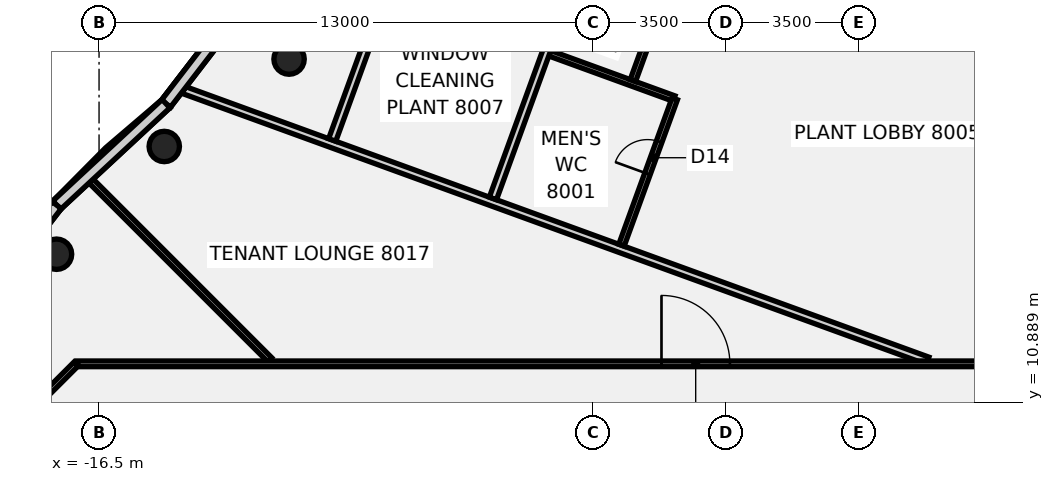
"""IFC4 building model, lengths in metres.
Left out: names, types, materials, properties, quantities, classifications, styles, units other than length and angle.
Written with IfcOpenShell. Run it as: python <this file> out.ifc"""

import sys

from ifc_helpers import new_model, si_unit, direction, frame, frame_2d, origin, origin_2d, place, context, subcontext, project, spatial, rectangle, circle, extrude, element, fill, save


model = new_model("IFC4")
c1 = context("Model", 3, precision=1e-05, world=origin(), true_north=direction((0.0, 1.0)))
c2 = subcontext(c1, "Body", "Model", "MODEL_VIEW")
j1 = project(units=[si_unit("LENGTHUNIT", "METRE"), si_unit("PLANEANGLEUNIT", "RADIAN")], contexts=[c1])
p1 = place(None, origin())
s1 = spatial("IfcSite", under=j1, at=p1, CompositionType="ELEMENT")
p2 = place(p1, origin())
s2 = spatial("IfcBuilding", under=s1, at=p2, CompositionType="ELEMENT")
p3 = place(p2, frame((0.0, 0.0, 325.4)))
s3 = spatial("IfcBuildingStorey", under=s2, at=p3, CompositionType="ELEMENT", Elevation=325.4)
for number, where, z_axis, x_axis in (
    (1, (-11.5, 19.919, -0.18), (0.0, 0.0, 1.0), (1.0, 0.0, 0.0)),
    (2, (-14.784, 17.619, -0.18), (0.0, 0.0, 1.0), (1.0, 0.0, 0.0)),
    (3, (-17.619, 14.784, -0.18), (0.0, 0.0, 1.0), (1.0, 0.0, 0.0)),
):
    element("IfcColumn", number, at=place(p3, frame(where, z_axis=z_axis, x_axis=x_axis)), inside=s3, PredefinedType="COLUMN", context=c2, shape_type="SweptSolid", body=[
        extrude(circle(Radius=0.4, at=origin_2d()), origin(), (0.0, 0.0, 1.0), 3.98),
    ])
p4 = place(p3, frame((-16.921, 16.921, 0.0), z_axis=(0.0, 0.0, 1.0), x_axis=(0.707106781187, -0.707106781187, 0.0)))
e4 = element("IfcWall", 4, at=p4, inside=s3, PredefinedType="PARTITIONING", context=c2, shape_type="SweptSolid", body=[
    extrude(rectangle(XDim=6.946, YDim=0.15, at=frame_2d((3.473, 0.0))), origin(), (0.0, 0.0, 1.0), 3.2),
])
p5 = place(p3, frame((-14.271, 19.106, 0.0), z_axis=(0.0, 0.0, 1.0), x_axis=(0.939707843555, -0.341978316216, 0.0)))
e5 = element("IfcWall", 5, at=p5, inside=s3, PredefinedType="PARTITIONING", context=c2, shape_type="SweptSolid", body=[
    extrude(rectangle(XDim=20.83, YDim=0.2, at=frame_2d((10.415, 0.0))), origin(), (0.0, 0.0, 1.0), 3.2),
])
p6 = place(p3, frame((-4.64, 20.071, 0.0), z_axis=(0.0, 0.0, 1.0), x_axis=(0.939625353143, -0.342204903138, 0.0)))
e6 = element("IfcWall", 6, at=p6, inside=s3, PredefinedType="PARTITIONING", context=c2, shape_type="SweptSolid", body=[
    extrude(rectangle(XDim=3.48, YDim=0.15, at=frame_2d((1.74, 0.0))), origin(), (0.0, 0.0, 1.0), 3.2),
])
p7 = place(p3, frame((-17.065, 11.9, 0.0), z_axis=(0.0, 0.0, 1.0), x_axis=(1.0, 0.0, 0.0)))
e7 = element("IfcWall", 7, at=p7, inside=s3, PredefinedType="PARTITIONING", context=c2, shape_type="SweptSolid", body=[
    extrude(rectangle(XDim=34.165, YDim=0.15, at=frame_2d((17.083, 0.0))), origin(), (0.0, 0.0, 1.0), 3.2),
])
p8 = place(p7, frame((24.544, 0.0, 0.0)))
e8 = element("IfcOpeningElement", 8, at=p8, cuts=e7, PredefinedType="OPENING", context=c2, shape_type="SweptSolid", body=[
    extrude(rectangle(XDim=1.8, YDim=2.1, at=frame_2d((0.9, 1.05))), frame((0.0, 0.085, 0.0), z_axis=(0.0, -1.0, 0.0), x_axis=(1.0, 0.0, 0.0)), (0.0, 0.0, 1.0), 0.17),
])
p9 = place(p7, frame((31.665, 0.0, 0.0)))
e9 = element("IfcOpeningElement", 9, at=p9, cuts=e7, PredefinedType="OPENING", context=c2, shape_type="SweptSolid", body=[
    extrude(rectangle(XDim=0.9, YDim=2.1, at=frame_2d((0.45, 1.05))), frame((0.0, 0.085, 0.0), z_axis=(0.0, -1.0, 0.0), x_axis=(1.0, 0.0, 0.0)), (0.0, 0.0, 1.0), 0.17),
])
p10 = place(p7, frame((15.365, 0.0, 0.0)))
e10 = element("IfcOpeningElement", 10, at=p10, cuts=e7, PredefinedType="OPENING", context=c2, shape_type="SweptSolid", body=[
    extrude(rectangle(XDim=1.8, YDim=2.1, at=frame_2d((0.9, 1.05))), frame((0.0, 0.085, 0.0), z_axis=(0.0, -1.0, 0.0), x_axis=(1.0, 0.0, 0.0)), (0.0, 0.0, 1.0), 0.17),
])
p11 = place(p3, frame((-18.872, 10.128, 0.0), z_axis=(0.0, 0.0, 1.0), x_axis=(0.707106781187, 0.707106781187, 0.0)))
e11 = element("IfcWall", 11, at=p11, inside=s3, PredefinedType="PARTITIONING", context=c2, shape_type="SweptSolid", body=[
    extrude(rectangle(XDim=2.505, YDim=0.15, at=frame_2d((1.253, 0.0))), origin(), (0.0, 0.0, 1.0), 3.2),
])
p12 = place(p3, frame((-10.365, 17.791, 0.0), z_axis=(0.0, 0.0, 1.0), x_axis=(0.342032792834, 0.939688016645, 0.0)))
e12 = element("IfcWall", 12, at=p12, inside=s3, PredefinedType="PARTITIONING", context=c2, shape_type="SweptSolid", body=[
    extrude(rectangle(XDim=8.66, YDim=0.2, at=frame_2d((4.33, 0.0))), origin(), (0.0, 0.0, 1.0), 3.2),
])
p13 = place(p12, frame((6.6, 0.0, 0.0)))
e13 = element("IfcOpeningElement", 13, at=p13, cuts=e12, PredefinedType="OPENING", context=c2, shape_type="SweptSolid", body=[
    extrude(rectangle(XDim=1.4, YDim=2.1, at=frame_2d((0.7, 1.05))), frame((0.0, 0.11, 0.0), z_axis=(0.0, -1.0, 0.0), x_axis=(1.0, 0.0, 0.0)), (0.0, 0.0, 1.0), 0.22),
])
p14 = place(p3, frame((-6.136, 16.252, 0.0), z_axis=(0.0, 0.0, 1.0), x_axis=(0.341890434998, 0.939739820619, 0.0)))
e14 = element("IfcWall", 14, at=p14, inside=s3, PredefinedType="PARTITIONING", context=c2, shape_type="SweptSolid", body=[
    extrude(rectangle(XDim=6.518, YDim=0.2, at=frame_2d((3.259, 0.0))), origin(), (0.0, 0.0, 1.0), 3.2),
])
p15 = place(p3, frame((-2.753, 15.021, 0.0), z_axis=(0.0, 0.0, 1.0), x_axis=(0.341929559358, 0.939725585709, 0.0)))
e15 = element("IfcWall", 15, at=p15, inside=s3, PredefinedType="PARTITIONING", context=c2, shape_type="SweptSolid", body=[
    extrude(rectangle(XDim=4.099, YDim=0.15, at=frame_2d((2.05, 0.0))), origin(), (0.0, 0.0, 1.0), 3.2),
])
p16 = place(p15, frame((2.0, 0.0, 0.0)))
e16 = element("IfcOpeningElement", 16, at=p16, cuts=e15, PredefinedType="OPENING", context=c2, shape_type="SweptSolid", body=[
    extrude(rectangle(XDim=0.9, YDim=2.1, at=frame_2d((0.45, 1.05))), frame((0.0, 0.085, 0.0), z_axis=(0.0, -1.0, 0.0), x_axis=(1.0, 0.0, 0.0)), (0.0, 0.0, 1.0), 0.17),
])
p17 = place(p3, frame((-2.452, 19.354, 0.0), z_axis=(0.0, 0.0, 1.0), x_axis=(0.341765797908, 0.939785155969, 0.0)))
e17 = element("IfcWall", 17, at=p17, inside=s3, PredefinedType="PARTITIONING", context=c2, shape_type="SweptSolid", body=[
    extrude(rectangle(XDim=1.724, YDim=0.15, at=frame_2d((0.862, 0.0))), origin(), (0.0, 0.0, 1.0), 3.2),
])
p18 = place(p3, frame((-13.409, 20.474, 0.0), z_axis=(0.0, 0.0, 1.0), x_axis=(-0.609396950442, -0.792865282877, 0.0)))
e18 = element("IfcWall", 18, at=p18, inside=s3, PredefinedType="SOLIDWALL", context=c2, shape_type="SweptSolid", body=[
    extrude(rectangle(XDim=2.181, YDim=0.3, at=frame_2d((1.09, 0.0))), origin(), (0.0, 0.0, 1.0), 3.8),
])
p19 = place(p3, frame((-14.739, 18.745, 0.0), z_axis=(0.0, 0.0, 1.0), x_axis=(-0.73266715928, -0.680587124263, 0.0)))
e19 = element("IfcWall", 19, at=p19, inside=s3, PredefinedType="SOLIDWALL", context=c2, shape_type="SweptSolid", body=[
    extrude(rectangle(XDim=3.924, YDim=0.3, at=frame_2d((1.962, 0.0))), origin(), (0.0, 0.0, 1.0), 3.8),
])
p20 = place(p3, frame((-17.613, 16.075, 0.0), z_axis=(0.0, 0.0, 1.0), x_axis=(-0.610785688376, -0.79179596038, 0.0)))
e20 = element("IfcWall", 20, at=p20, inside=s3, PredefinedType="SOLIDWALL", context=c2, shape_type="SweptSolid", body=[
    extrude(rectangle(XDim=3.938, YDim=0.3, at=frame_2d((1.969, 0.0))), origin(), (0.0, 0.0, 1.0), 3.8),
])
p21 = place(p3, frame((-13.409, 20.474, 4.0), z_axis=(0.0, 0.0, 1.0), x_axis=(-0.609396950442, -0.792865282877, 0.0)))
e21 = element("IfcWall", 21, at=p21, inside=s3, PredefinedType="PARAPET", context=c2, shape_type="SweptSolid", body=[
    extrude(rectangle(XDim=2.181, YDim=0.3, at=frame_2d((1.09, 0.0))), origin(), (0.0, 0.0, 1.0), 1.1),
])
p22 = place(p3, frame((-14.739, 18.745, 4.0), z_axis=(0.0, 0.0, 1.0), x_axis=(-0.73266715928, -0.680587124263, 0.0)))
e22 = element("IfcWall", 22, at=p22, inside=s3, PredefinedType="PARAPET", context=c2, shape_type="SweptSolid", body=[
    extrude(rectangle(XDim=3.924, YDim=0.3, at=frame_2d((1.962, 0.0))), origin(), (0.0, 0.0, 1.0), 1.1),
])
p23 = place(p3, frame((-17.613, 16.075, 4.0), z_axis=(0.0, 0.0, 1.0), x_axis=(-0.610785688376, -0.79179596038, 0.0)))
e23 = element("IfcWall", 23, at=p23, inside=s3, PredefinedType="PARAPET", context=c2, shape_type="SweptSolid", body=[
    extrude(rectangle(XDim=3.938, YDim=0.3, at=frame_2d((1.969, 0.0))), origin(), (0.0, 0.0, 1.0), 1.1),
])
p24 = place(p10, origin())
e24 = element("IfcDoor", 24, at=p24, inside=s3, OperationType="DOUBLE_DOOR_SINGLE_SWING", PredefinedType="DOOR", context=c2, shape_type="SweptSolid", body=[
    extrude(rectangle(XDim=1.8, YDim=2.1, at=frame_2d((0.9, 1.05))), frame((0.0, 0.025, 0.0), z_axis=(0.0, -1.0, 0.0), x_axis=(1.0, 0.0, 0.0)), (0.0, 0.0, 1.0), 0.05),
])
fill(e10, e24)
p25 = place(p16, origin())
e25 = element("IfcDoor", 25, at=p25, inside=s3, OperationType="SINGLE_SWING_LEFT", PredefinedType="DOOR", context=c2, shape_type="SweptSolid", body=[
    extrude(rectangle(XDim=0.9, YDim=2.1, at=frame_2d((0.45, 1.05))), frame((0.0, 0.025, 0.0), z_axis=(0.0, -1.0, 0.0), x_axis=(1.0, 0.0, 0.0)), (0.0, 0.0, 1.0), 0.05),
])
fill(e16, e25)
save(model, sys.argv[1])
